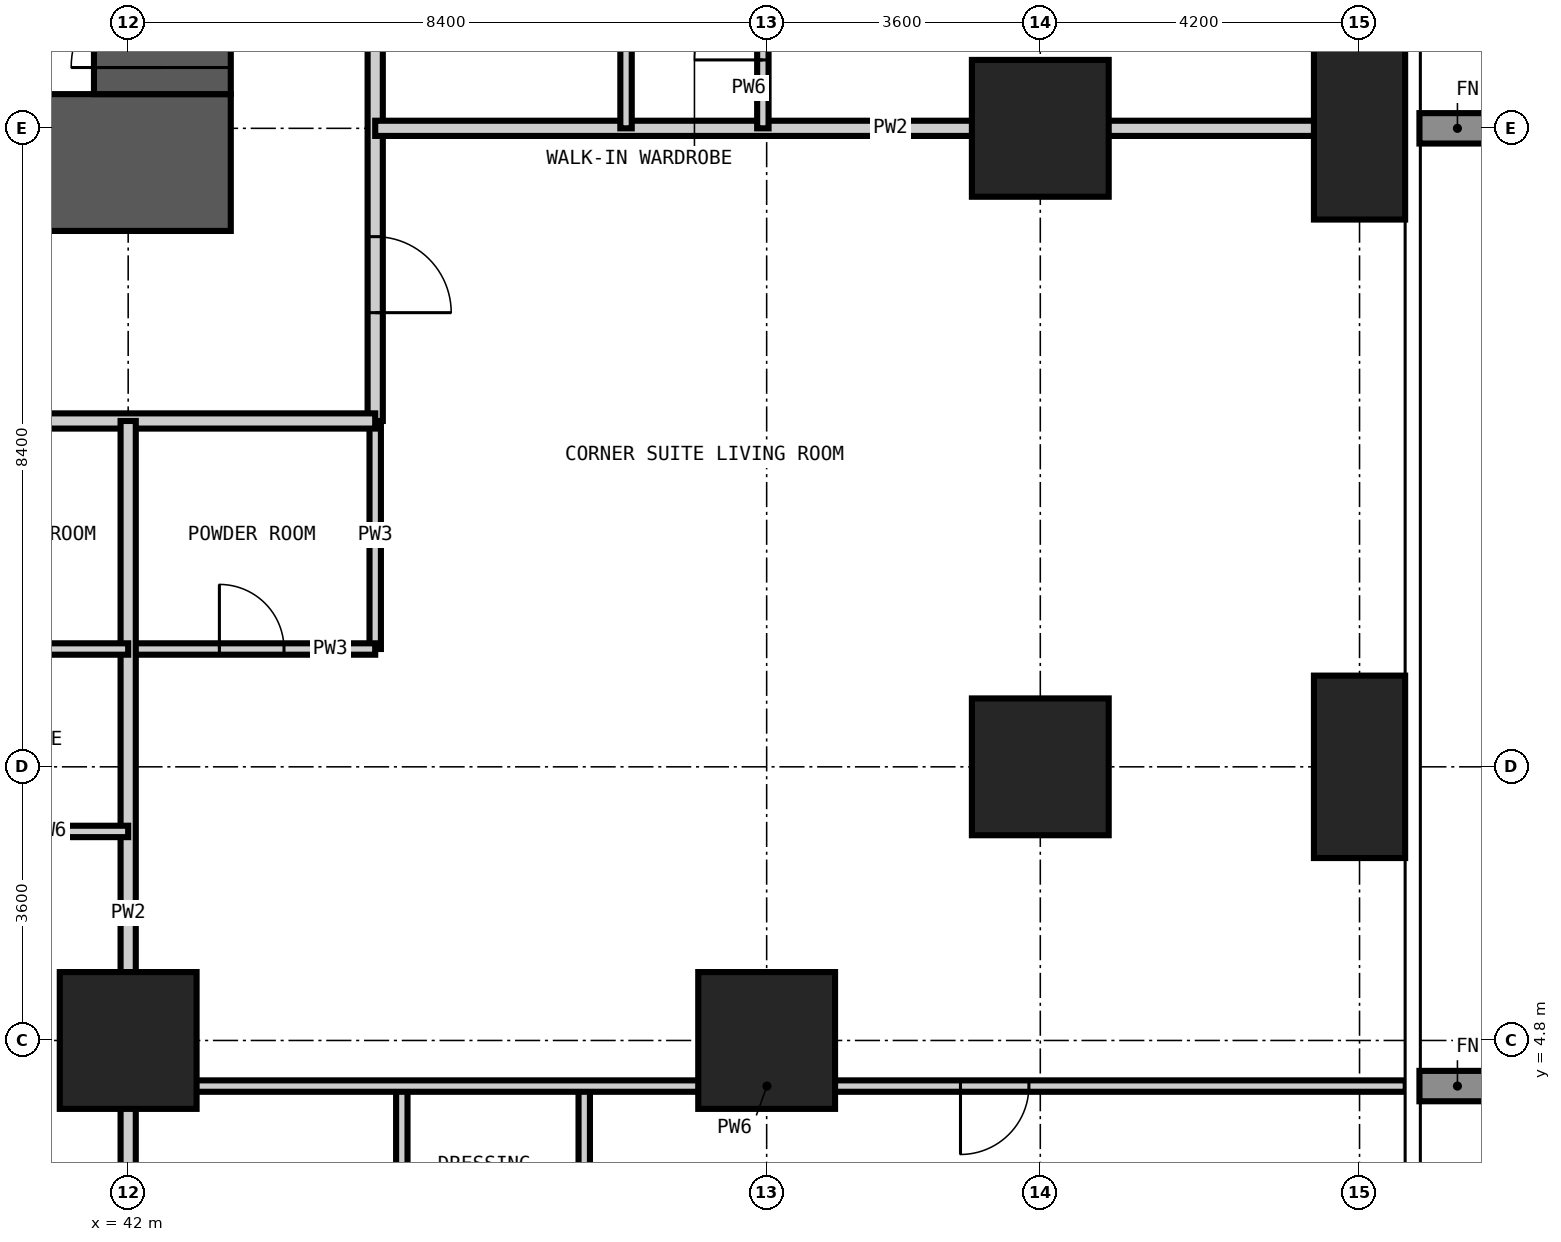
"""IFC4 building model, lengths in metres.
Left out: names, types, materials, properties, quantities, classifications, styles, units other than length and angle.
Written with IfcOpenShell. Run it as: python <this file> out.ifc"""

import sys

from ifc_helpers import new_model, si_unit, direction, frame, frame_2d, origin, origin_2d, place, context, subcontext, project, spatial, rectangle, extrude, element, fill, save


model = new_model("IFC4")
c1 = context("Model", 3, precision=1e-05, world=origin(), true_north=direction((0.0, 1.0)))
c2 = subcontext(c1, "Body", "Model", "MODEL_VIEW")
j1 = project(units=[si_unit("LENGTHUNIT", "METRE"), si_unit("PLANEANGLEUNIT", "RADIAN")], contexts=[c1])
p1 = place(None, origin())
s1 = spatial("IfcSite", under=j1, at=p1, CompositionType="ELEMENT")
p2 = place(p1, origin())
s2 = spatial("IfcBuilding", under=s1, at=p2, CompositionType="ELEMENT")
p3 = place(p2, frame((0.0, 0.0, 45.0)))
s3 = spatial("IfcBuildingStorey", under=s2, at=p3, CompositionType="ELEMENT", Elevation=45.0)
for number, where, z_axis, x_axis in (
    (1, (42.0, 4.8, -0.35), (0.0, 0.0, 1.0), (1.0, 0.0, 0.0)),
    (2, (50.4, 4.8, -0.35), (0.0, 0.0, 1.0), (1.0, 0.0, 0.0)),
    (3, (54.0, 8.4, -0.35), (0.0, 0.0, 1.0), (1.0, 0.0, 0.0)),
    (4, (54.0, 16.8, -0.35), (0.0, 0.0, 1.0), (1.0, 0.0, 0.0)),
):
    element("IfcColumn", number, at=place(p3, frame(where, z_axis=z_axis, x_axis=x_axis)), inside=s3, PredefinedType="COLUMN", context=c2, shape_type="SweptSolid", body=[
        extrude(rectangle(XDim=1.8, YDim=1.8, at=origin_2d()), origin(), (0.0, 0.0, 1.0), 3.6),
    ])
for number, where, z_axis, x_axis in (
    (5, (58.2, 8.4, -0.35), (0.0, 0.0, 1.0), (1.0, 0.0, 0.0)),
    (6, (58.2, 16.8, -0.35), (0.0, 0.0, 1.0), (1.0, 0.0, 0.0)),
):
    element("IfcColumn", number, at=place(p3, frame(where, z_axis=z_axis, x_axis=x_axis)), inside=s3, PredefinedType="COLUMN", context=c2, shape_type="SweptSolid", body=[
        extrude(rectangle(XDim=1.2, YDim=2.4, at=origin_2d()), origin(), (0.0, 0.0, 1.0), 3.6),
    ])
p4 = place(p3, frame((15.45, 16.35, -0.35), z_axis=(0.0, 0.0, 1.0), x_axis=(1.0, 0.0, 0.0)))
e7 = element("IfcWall", 7, at=p4, inside=s3, PredefinedType="SHEAR", context=c2, shape_type="SweptSolid", body=[
    extrude(rectangle(XDim=27.9, YDim=1.8, at=frame_2d((13.95, 0.0))), origin(), (0.0, 0.0, 1.0), 3.6),
])
p5 = place(p4, frame((13.45, 0.0, 0.35)))
e8 = element("IfcOpeningElement", 8, at=p5, cuts=e7, PredefinedType="OPENING", context=c2, shape_type="SweptSolid", body=[
    extrude(rectangle(XDim=1.0, YDim=2.1, at=frame_2d((0.5, 1.05))), frame((0.0, 0.91, 0.0), z_axis=(0.0, -1.0, 0.0), x_axis=(1.0, 0.0, 0.0)), (0.0, 0.0, 1.0), 1.82),
])
p6 = place(p4, frame((19.75, 0.0, 0.35)))
e9 = element("IfcOpeningElement", 9, at=p6, cuts=e7, PredefinedType="OPENING", context=c2, shape_type="SweptSolid", body=[
    extrude(rectangle(XDim=1.0, YDim=2.1, at=frame_2d((0.5, 1.05))), frame((0.0, 0.91, 0.0), z_axis=(0.0, -1.0, 0.0), x_axis=(1.0, 0.0, 0.0)), (0.0, 0.0, 1.0), 1.82),
])
p7 = place(p3, frame((42.45, 17.25, -0.35), z_axis=(0.0, 0.0, 1.0), x_axis=(0.0, 1.0, 0.0)))
e10 = element("IfcWall", 10, at=p7, inside=s3, PredefinedType="SHEAR", context=c2, shape_type="SweptSolid", body=[
    extrude(rectangle(XDim=24.3, YDim=1.8, at=frame_2d((12.15, 0.0))), origin(), (0.0, 0.0, 1.0), 3.6),
])
p8 = place(p7, frame((0.35, 0.0, 0.35)))
e11 = element("IfcOpeningElement", 11, at=p8, cuts=e10, PredefinedType="OPENING", context=c2, shape_type="SweptSolid", body=[
    extrude(rectangle(XDim=1.2, YDim=2.2, at=frame_2d((0.6, 1.1))), frame((0.0, 0.91, 0.0), z_axis=(0.0, -1.0, 0.0), x_axis=(1.0, 0.0, 0.0)), (0.0, 0.0, 1.0), 1.82),
])
p9 = place(p7, frame((11.65, 0.0, 0.35)))
e12 = element("IfcOpeningElement", 12, at=p9, cuts=e10, PredefinedType="OPENING", context=c2, shape_type="SweptSolid", body=[
    extrude(rectangle(XDim=1.0, YDim=2.1, at=frame_2d((0.5, 1.05))), frame((0.0, 0.91, 0.0), z_axis=(0.0, -1.0, 0.0), x_axis=(1.0, 0.0, 0.0)), (0.0, 0.0, 1.0), 1.82),
])
p10 = place(p7, frame((20.05, 0.0, 0.35)))
e13 = element("IfcOpeningElement", 13, at=p10, cuts=e10, PredefinedType="OPENING", context=c2, shape_type="SweptSolid", body=[
    extrude(rectangle(XDim=1.0, YDim=2.1, at=frame_2d((0.5, 1.05))), frame((0.0, 0.91, 0.0), z_axis=(0.0, -1.0, 0.0), x_axis=(1.0, 0.0, 0.0)), (0.0, 0.0, 1.0), 1.82),
])
p11 = place(p3, frame((45.25, 9.95, 0.0), z_axis=(0.0, 0.0, 1.0), x_axis=(0.0, 1.0, 0.0)))
e14 = element("IfcWall", 14, at=p11, inside=s3, PredefinedType="PARTITIONING", context=c2, shape_type="SweptSolid", body=[
    extrude(rectangle(XDim=3.0, YDim=0.15, at=frame_2d((1.5, 0.0))), origin(), (0.0, 0.0, 1.0), 3.25),
])
p12 = place(p3, frame((42.0, 9.95, 0.0), z_axis=(0.0, 0.0, 1.0), x_axis=(1.0, 0.0, 0.0)))
e15 = element("IfcWall", 15, at=p12, inside=s3, PredefinedType="PARTITIONING", context=c2, shape_type="SweptSolid", body=[
    extrude(rectangle(XDim=3.25, YDim=0.15, at=frame_2d((1.625, 0.0))), origin(), (0.0, 0.0, 1.0), 3.25),
])
p13 = place(p12, frame((1.2, 0.0, 0.0)))
e16 = element("IfcOpeningElement", 16, at=p13, cuts=e15, PredefinedType="OPENING", context=c2, shape_type="SweptSolid", body=[
    extrude(rectangle(XDim=0.85, YDim=2.1, at=frame_2d((0.425, 1.05))), frame((0.0, 0.085, 0.0), z_axis=(0.0, -1.0, 0.0), x_axis=(1.0, 0.0, 0.0)), (0.0, 0.0, 1.0), 0.17),
])
p14 = place(p3, frame((45.25, 45.55, 0.0), z_axis=(0.0, 0.0, 1.0), x_axis=(0.0, -1.0, 0.0)))
e17 = element("IfcWall", 17, at=p14, inside=s3, PredefinedType="PARTITIONING", context=c2, shape_type="SweptSolid", body=[
    extrude(rectangle(XDim=32.6, YDim=0.2, at=frame_2d((16.3, 0.0))), origin(), (0.0, 0.0, 1.0), 3.25),
])
p15 = place(p14, frame((24.8, 0.0, 0.0)))
e18 = element("IfcOpeningElement", 18, at=p15, cuts=e17, PredefinedType="OPENING", context=c2, shape_type="SweptSolid", body=[
    extrude(rectangle(XDim=1.0, YDim=2.2, at=frame_2d((0.5, 1.1))), frame((0.0, 0.11, 0.0), z_axis=(0.0, -1.0, 0.0), x_axis=(1.0, 0.0, 0.0)), (0.0, 0.0, 1.0), 0.22),
])
p16 = place(p14, frame((19.85, 0.0, 0.0)))
e19 = element("IfcOpeningElement", 19, at=p16, cuts=e17, PredefinedType="OPENING", context=c2, shape_type="SweptSolid", body=[
    extrude(rectangle(XDim=1.0, YDim=2.2, at=frame_2d((0.5, 1.1))), frame((0.0, 0.11, 0.0), z_axis=(0.0, -1.0, 0.0), x_axis=(1.0, 0.0, 0.0)), (0.0, 0.0, 1.0), 0.22),
])
p17 = place(p14, frame((11.45, 0.0, 0.0)))
e20 = element("IfcOpeningElement", 20, at=p17, cuts=e17, PredefinedType="OPENING", context=c2, shape_type="SweptSolid", body=[
    extrude(rectangle(XDim=1.0, YDim=2.2, at=frame_2d((0.5, 1.1))), frame((0.0, 0.11, 0.0), z_axis=(0.0, -1.0, 0.0), x_axis=(1.0, 0.0, 0.0)), (0.0, 0.0, 1.0), 0.22),
])
p18 = place(p14, frame((6.5, 0.0, 0.0)))
e21 = element("IfcOpeningElement", 21, at=p18, cuts=e17, PredefinedType="OPENING", context=c2, shape_type="SweptSolid", body=[
    extrude(rectangle(XDim=1.0, YDim=2.2, at=frame_2d((0.5, 1.1))), frame((0.0, 0.11, 0.0), z_axis=(0.0, -1.0, 0.0), x_axis=(1.0, 0.0, 0.0)), (0.0, 0.0, 1.0), 0.22),
])
p19 = place(p14, frame((30.175, 0.0, 0.0)))
e22 = element("IfcOpeningElement", 22, at=p19, cuts=e17, PredefinedType="OPENING", context=c2, shape_type="SweptSolid", body=[
    extrude(rectangle(XDim=1.0, YDim=2.2, at=frame_2d((0.5, 1.1))), frame((0.0, 0.11, 0.0), z_axis=(0.0, -1.0, 0.0), x_axis=(1.0, 0.0, 0.0)), (0.0, 0.0, 1.0), 0.22),
])
p20 = place(p14, frame((1.275, 0.0, 0.0)))
e23 = element("IfcOpeningElement", 23, at=p20, cuts=e17, PredefinedType="OPENING", context=c2, shape_type="SweptSolid", body=[
    extrude(rectangle(XDim=1.0, YDim=2.2, at=frame_2d((0.5, 1.1))), frame((0.0, 0.11, 0.0), z_axis=(0.0, -1.0, 0.0), x_axis=(1.0, 0.0, 0.0)), (0.0, 0.0, 1.0), 0.22),
])
p21 = place(p3, frame((45.25, 12.95, 0.0), z_axis=(0.0, 0.0, 1.0), x_axis=(-1.0, 0.0, 0.0)))
e24 = element("IfcWall", 24, at=p21, inside=s3, PredefinedType="PARTITIONING", context=c2, shape_type="SweptSolid", body=[
    extrude(rectangle(XDim=32.3, YDim=0.2, at=frame_2d((16.15, 0.0))), origin(), (0.0, 0.0, 1.0), 3.25),
])
p22 = place(p21, frame((24.65, 0.0, 0.0)))
e25 = element("IfcOpeningElement", 25, at=p22, cuts=e24, PredefinedType="OPENING", context=c2, shape_type="SweptSolid", body=[
    extrude(rectangle(XDim=1.0, YDim=2.2, at=frame_2d((0.5, 1.1))), frame((0.0, 0.11, 0.0), z_axis=(0.0, -1.0, 0.0), x_axis=(1.0, 0.0, 0.0)), (0.0, 0.0, 1.0), 0.22),
])
p23 = place(p21, frame((16.25, 0.0, 0.0)))
e26 = element("IfcOpeningElement", 26, at=p23, cuts=e24, PredefinedType="OPENING", context=c2, shape_type="SweptSolid", body=[
    extrude(rectangle(XDim=1.0, YDim=2.2, at=frame_2d((0.5, 1.1))), frame((0.0, 0.11, 0.0), z_axis=(0.0, -1.0, 0.0), x_axis=(1.0, 0.0, 0.0)), (0.0, 0.0, 1.0), 0.22),
])
p24 = place(p21, frame((7.85, 0.0, 0.0)))
e27 = element("IfcOpeningElement", 27, at=p24, cuts=e24, PredefinedType="OPENING", context=c2, shape_type="SweptSolid", body=[
    extrude(rectangle(XDim=1.0, YDim=2.2, at=frame_2d((0.5, 1.1))), frame((0.0, 0.11, 0.0), z_axis=(0.0, -1.0, 0.0), x_axis=(1.0, 0.0, 0.0)), (0.0, 0.0, 1.0), 0.22),
])
p25 = place(p3, frame((42.0, -0.008, 0.0), z_axis=(0.0, 0.0, 1.0), x_axis=(0.0, 1.0, 0.0)))
e28 = element("IfcWall", 28, at=p25, inside=s3, PredefinedType="PARTITIONING", context=c2, shape_type="SweptSolid", body=[
    extrude(rectangle(XDim=12.958, YDim=0.2, at=frame_2d((6.479, 0.0))), origin(), (0.0, 0.0, 1.0), 3.25),
])
p26 = place(p3, frame((45.25, 16.8, 0.0), z_axis=(0.0, 0.0, 1.0), x_axis=(1.0, 0.0, 0.0)))
e29 = element("IfcWall", 29, at=p26, inside=s3, PredefinedType="PARTITIONING", context=c2, shape_type="SweptSolid", body=[
    extrude(rectangle(XDim=13.558, YDim=0.2, at=frame_2d((6.779, 0.0))), origin(), (0.0, 0.0, 1.0), 3.25),
])
p27 = place(p3, frame((45.6, 1.2, 0.0), z_axis=(0.0, 0.0, 1.0), x_axis=(0.0, 1.0, 0.0)))
e30 = element("IfcWall", 30, at=p27, inside=s3, PredefinedType="PARTITIONING", context=c2, shape_type="SweptSolid", body=[
    extrude(rectangle(XDim=3.0, YDim=0.15, at=frame_2d((1.5, 0.0))), origin(), (0.0, 0.0, 1.0), 3.25),
])
p28 = place(p3, frame((48.0, 1.2, 0.0), z_axis=(0.0, 0.0, 1.0), x_axis=(0.0, 1.0, 0.0)))
e31 = element("IfcWall", 31, at=p28, inside=s3, PredefinedType="PARTITIONING", context=c2, shape_type="SweptSolid", body=[
    extrude(rectangle(XDim=3.0, YDim=0.15, at=frame_2d((1.5, 0.0))), origin(), (0.0, 0.0, 1.0), 3.25),
])
p29 = place(p28, frame((1.05, 0.0, 0.0)))
e32 = element("IfcOpeningElement", 32, at=p29, cuts=e31, PredefinedType="OPENING", context=c2, shape_type="SweptSolid", body=[
    extrude(rectangle(XDim=0.9, YDim=2.1, at=frame_2d((0.45, 1.05))), frame((0.0, 0.085, 0.0), z_axis=(0.0, -1.0, 0.0), x_axis=(1.0, 0.0, 0.0)), (0.0, 0.0, 1.0), 0.17),
])
p30 = place(p3, frame((48.55, 16.8, 0.0), z_axis=(0.0, 0.0, 1.0), x_axis=(0.0, 1.0, 0.0)))
e33 = element("IfcWall", 33, at=p30, inside=s3, PredefinedType="PARTITIONING", context=c2, shape_type="SweptSolid", body=[
    extrude(rectangle(XDim=2.7, YDim=0.15, at=frame_2d((1.35, 0.0))), origin(), (0.0, 0.0, 1.0), 3.25),
])
p31 = place(p3, frame((50.35, 16.8, 0.0), z_axis=(0.0, 0.0, 1.0), x_axis=(0.0, 1.0, 0.0)))
e34 = element("IfcWall", 34, at=p31, inside=s3, PredefinedType="PARTITIONING", context=c2, shape_type="SweptSolid", body=[
    extrude(rectangle(XDim=2.7, YDim=0.15, at=frame_2d((1.35, 0.0))), origin(), (0.0, 0.0, 1.0), 3.25),
])
p32 = place(p31, frame((0.9, 0.0, 0.0)))
e35 = element("IfcOpeningElement", 35, at=p32, cuts=e34, PredefinedType="OPENING", context=c2, shape_type="SweptSolid", body=[
    extrude(rectangle(XDim=0.9, YDim=2.1, at=frame_2d((0.45, 1.05))), frame((0.0, 0.085, 0.0), z_axis=(0.0, -1.0, 0.0), x_axis=(1.0, 0.0, 0.0)), (0.0, 0.0, 1.0), 0.17),
])
p33 = place(p3, frame((42.0, 4.2, 0.0), z_axis=(0.0, 0.0, 1.0), x_axis=(1.0, 0.0, 0.0)))
e36 = element("IfcWall", 36, at=p33, inside=s3, PredefinedType="PARTITIONING", context=c2, shape_type="SweptSolid", body=[
    extrude(rectangle(XDim=16.808, YDim=0.15, at=frame_2d((8.404, 0.0))), origin(), (0.0, 0.0, 1.0), 3.25),
])
p34 = place(p33, frame((10.95, 0.0, 0.0)))
e37 = element("IfcOpeningElement", 37, at=p34, cuts=e36, PredefinedType="OPENING", context=c2, shape_type="SweptSolid", body=[
    extrude(rectangle(XDim=0.9, YDim=2.1, at=frame_2d((0.45, 1.05))), frame((0.0, 0.085, 0.0), z_axis=(0.0, -1.0, 0.0), x_axis=(1.0, 0.0, 0.0)), (0.0, 0.0, 1.0), 0.17),
])
p35 = place(p3, frame((37.8, 7.55, 0.0), z_axis=(0.0, 0.0, 1.0), x_axis=(1.0, 0.0, 0.0)))
e38 = element("IfcWall", 38, at=p35, inside=s3, PredefinedType="PARTITIONING", context=c2, shape_type="SweptSolid", body=[
    extrude(rectangle(XDim=4.2, YDim=0.15, at=frame_2d((2.1, 0.0))), origin(), (0.0, 0.0, 1.0), 3.25),
])
p36 = place(p35, frame((1.65, 0.0, 0.0)))
e39 = element("IfcOpeningElement", 39, at=p36, cuts=e38, PredefinedType="OPENING", context=c2, shape_type="SweptSolid", body=[
    extrude(rectangle(XDim=0.9, YDim=2.1, at=frame_2d((0.45, 1.05))), frame((0.0, 0.085, 0.0), z_axis=(0.0, -1.0, 0.0), x_axis=(1.0, 0.0, 0.0)), (0.0, 0.0, 1.0), 0.17),
])
p37 = place(p3, frame((37.8, 9.95, 0.0), z_axis=(0.0, 0.0, 1.0), x_axis=(1.0, 0.0, 0.0)))
e40 = element("IfcWall", 40, at=p37, inside=s3, PredefinedType="PARTITIONING", context=c2, shape_type="SweptSolid", body=[
    extrude(rectangle(XDim=4.2, YDim=0.15, at=frame_2d((2.1, 0.0))), origin(), (0.0, 0.0, 1.0), 3.25),
])
p38 = place(p8, origin())
e41 = element("IfcDoor", 41, at=p38, inside=s3, OperationType="SINGLE_SWING_LEFT", PredefinedType="DOOR", context=c2, shape_type="SweptSolid", body=[
    extrude(rectangle(XDim=1.2, YDim=2.2, at=frame_2d((0.6, 1.1))), frame((0.0, 0.025, 0.0), z_axis=(0.0, -1.0, 0.0), x_axis=(1.0, 0.0, 0.0)), (0.0, 0.0, 1.0), 0.05),
])
fill(e11, e41)
p39 = place(p32, origin())
e42 = element("IfcDoor", 42, at=p39, inside=s3, OperationType="SINGLE_SWING_LEFT", PredefinedType="DOOR", context=c2, shape_type="SweptSolid", body=[
    extrude(rectangle(XDim=0.9, YDim=2.1, at=frame_2d((0.45, 1.05))), frame((0.0, 0.025, 0.0), z_axis=(0.0, -1.0, 0.0), x_axis=(1.0, 0.0, 0.0)), (0.0, 0.0, 1.0), 0.05),
])
fill(e35, e42)
p40 = place(p19, origin())
e43 = element("IfcDoor", 43, at=p40, inside=s3, OperationType="SINGLE_SWING_RIGHT", PredefinedType="DOOR", context=c2, shape_type="SweptSolid", body=[
    extrude(rectangle(XDim=1.0, YDim=2.2, at=frame_2d((0.5, 1.1))), frame((0.0, 0.025, 0.0), z_axis=(0.0, -1.0, 0.0), x_axis=(1.0, 0.0, 0.0)), (0.0, 0.0, 1.0), 0.05),
])
fill(e22, e43)
p41 = place(p13, origin())
e44 = element("IfcDoor", 44, at=p41, inside=s3, OperationType="SINGLE_SWING_LEFT", PredefinedType="DOOR", context=c2, shape_type="SweptSolid", body=[
    extrude(rectangle(XDim=0.85, YDim=2.1, at=frame_2d((0.425, 1.05))), frame((0.0, 0.025, 0.0), z_axis=(0.0, -1.0, 0.0), x_axis=(1.0, 0.0, 0.0)), (0.0, 0.0, 1.0), 0.05),
])
fill(e16, e44)
p42 = place(p34, frame((0.9, 0.0, 0.0), z_axis=(0.0, 0.0, 1.0), x_axis=(-1.0, 0.0, 0.0)))
e45 = element("IfcDoor", 45, at=p42, inside=s3, OperationType="SINGLE_SWING_RIGHT", PredefinedType="DOOR", context=c2, shape_type="SweptSolid", body=[
    extrude(rectangle(XDim=0.9, YDim=2.1, at=frame_2d((0.45, 1.05))), frame((0.0, 0.025, 0.0), z_axis=(0.0, -1.0, 0.0), x_axis=(1.0, 0.0, 0.0)), (0.0, 0.0, 1.0), 0.05),
])
fill(e37, e45)
save(model, sys.argv[1])
